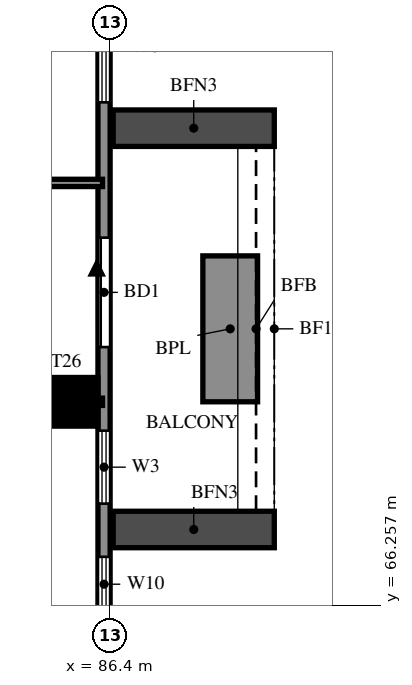
"""IFC4 building model, lengths in metres.
Left out: names, types, materials, properties, quantities, classifications, styles, units other than length and angle.
Written with IfcOpenShell. Run it as: python <this file> out.ifc"""

import sys

from ifc_helpers import new_model, si_unit, direction, frame, frame_2d, origin, origin_2d, place, context, subcontext, project, spatial, rectangle, extrude, source, transform, mapped, element, fill, save


model = new_model("IFC4")
c1 = context("Model", 3, precision=1e-05, world=origin(), true_north=direction((0.0, 1.0)))
c2 = subcontext(c1, "Body", "Model", "MODEL_VIEW")
j1 = project(units=[si_unit("LENGTHUNIT", "METRE"), si_unit("PLANEANGLEUNIT", "RADIAN")], contexts=[c1])
p1 = place(None, origin())
s1 = spatial("IfcSite", under=j1, at=p1, CompositionType="ELEMENT")
p2 = place(p1, origin())
s2 = spatial("IfcBuilding", under=s1, at=p2, CompositionType="ELEMENT")
p3 = place(p2, frame((0.0, 0.0, 185.0)))
s3 = spatial("IfcBuildingStorey", under=s2, at=p3, CompositionType="ELEMENT", Elevation=185.0)
m1 = source(origin(), c2, "Body", "SweptSolid", [
    extrude(rectangle(XDim=0.8, YDim=0.8, at=origin_2d()), origin(), (0.0, 0.0, 1.0), 3.2),
])
p4 = place(p3, frame((85.8, 69.6, 0.0), z_axis=(0.0, 0.0, 1.0), x_axis=(1.0, 0.0, 0.0)))
e1 = element("IfcColumn", 1, at=p4, inside=s3, PredefinedType="COLUMN", context=c2, shape_type="MappedRepresentation", body=[
    mapped(m1, transform((0.0, 0.0, 0.0))),
])
p5 = place(p3, frame((86.3, 48.2, 0.0), z_axis=(0.0, 0.0, 1.0), x_axis=(0.0, 1.0, 0.0)))
e2 = element("IfcWall", 2, at=p5, inside=s3, PredefinedType="SOLIDWALL", context=c2, shape_type="SweptSolid", body=[
    extrude(rectangle(XDim=28.6, YDim=0.2, at=frame_2d((14.3, 0.0))), origin(), (0.0, 0.0, 1.0), 3.2),
])
p6 = place(p5, frame((7.9, 0.0, 0.0)))
e3 = element("IfcOpeningElement", 3, at=p6, cuts=e2, PredefinedType="OPENING", context=c2, shape_type="SweptSolid", body=[
    extrude(rectangle(XDim=1.8, YDim=2.4, at=frame_2d((0.9, 1.2))), frame((0.0, 0.11, 0.0), z_axis=(0.0, -1.0, 0.0), x_axis=(1.0, 0.0, 0.0)), (0.0, 0.0, 1.0), 0.22),
])
p7 = place(p5, frame((22.3, 0.0, 0.0)))
e4 = element("IfcOpeningElement", 4, at=p7, cuts=e2, PredefinedType="OPENING", context=c2, shape_type="SweptSolid", body=[
    extrude(rectangle(XDim=1.8, YDim=2.4, at=frame_2d((0.9, 1.2))), frame((0.0, 0.11, 0.0), z_axis=(0.0, -1.0, 0.0), x_axis=(1.0, 0.0, 0.0)), (0.0, 0.0, 1.0), 0.22),
])
p8 = place(p5, frame((0.6, 0.0, 0.6)))
e5 = element("IfcOpeningElement", 5, at=p8, cuts=e2, PredefinedType="OPENING", context=c2, shape_type="SweptSolid", body=[
    extrude(rectangle(XDim=2.4, YDim=2.4, at=frame_2d((1.2, 1.2))), frame((0.0, 0.11, 0.0), z_axis=(0.0, -1.0, 0.0), x_axis=(1.0, 0.0, 0.0)), (0.0, 0.0, 1.0), 0.22),
])
p9 = place(p5, frame((3.55, 0.0, 0.6)))
e6 = element("IfcOpeningElement", 6, at=p9, cuts=e2, PredefinedType="OPENING", context=c2, shape_type="SweptSolid", body=[
    extrude(rectangle(XDim=0.9, YDim=2.4, at=frame_2d((0.45, 1.2))), frame((0.0, 0.11, 0.0), z_axis=(0.0, -1.0, 0.0), x_axis=(1.0, 0.0, 0.0)), (0.0, 0.0, 1.0), 0.22),
])
p10 = place(p5, frame((5.325, 0.0, 0.6)))
e7 = element("IfcOpeningElement", 7, at=p10, cuts=e2, PredefinedType="OPENING", context=c2, shape_type="SweptSolid", body=[
    extrude(rectangle(XDim=1.2, YDim=2.4, at=frame_2d((0.6, 1.2))), frame((0.0, 0.11, 0.0), z_axis=(0.0, -1.0, 0.0), x_axis=(1.0, 0.0, 0.0)), (0.0, 0.0, 1.0), 0.22),
])
p11 = place(p5, frame((11.925, 0.0, 0.6)))
e8 = element("IfcOpeningElement", 8, at=p11, cuts=e2, PredefinedType="OPENING", context=c2, shape_type="SweptSolid", body=[
    extrude(rectangle(XDim=1.8, YDim=2.4, at=frame_2d((0.9, 1.2))), frame((0.0, 0.11, 0.0), z_axis=(0.0, -1.0, 0.0), x_axis=(1.0, 0.0, 0.0)), (0.0, 0.0, 1.0), 0.22),
])
p12 = place(p5, frame((14.975, 0.0, 0.6)))
e9 = element("IfcOpeningElement", 9, at=p12, cuts=e2, PredefinedType="OPENING", context=c2, shape_type="SweptSolid", body=[
    extrude(rectangle(XDim=2.4, YDim=2.4, at=frame_2d((1.2, 1.2))), frame((0.0, 0.11, 0.0), z_axis=(0.0, -1.0, 0.0), x_axis=(1.0, 0.0, 0.0)), (0.0, 0.0, 1.0), 0.22),
])
p13 = place(p5, frame((17.95, 0.0, 0.6)))
e10 = element("IfcOpeningElement", 10, at=p13, cuts=e2, PredefinedType="OPENING", context=c2, shape_type="SweptSolid", body=[
    extrude(rectangle(XDim=0.9, YDim=2.4, at=frame_2d((0.45, 1.2))), frame((0.0, 0.11, 0.0), z_axis=(0.0, -1.0, 0.0), x_axis=(1.0, 0.0, 0.0)), (0.0, 0.0, 1.0), 0.22),
])
p14 = place(p5, frame((19.725, 0.0, 0.6)))
e11 = element("IfcOpeningElement", 11, at=p14, cuts=e2, PredefinedType="OPENING", context=c2, shape_type="SweptSolid", body=[
    extrude(rectangle(XDim=1.2, YDim=2.4, at=frame_2d((0.6, 1.2))), frame((0.0, 0.11, 0.0), z_axis=(0.0, -1.0, 0.0), x_axis=(1.0, 0.0, 0.0)), (0.0, 0.0, 1.0), 0.22),
])
p15 = place(p5, frame((26.325, 0.0, 0.6)))
e12 = element("IfcOpeningElement", 12, at=p15, cuts=e2, PredefinedType="OPENING", context=c2, shape_type="SweptSolid", body=[
    extrude(rectangle(XDim=1.8, YDim=2.4, at=frame_2d((0.9, 1.2))), frame((0.0, 0.11, 0.0), z_axis=(0.0, -1.0, 0.0), x_axis=(1.0, 0.0, 0.0)), (0.0, 0.0, 1.0), 0.22),
])
for number, where, z_axis, x_axis in (
    (13, (86.45, 67.5, 0.0), (0.0, 0.0, 1.0), (1.0, 0.0, 0.0)),
    (14, (86.45, 74.1, 0.0), (0.0, 0.0, 1.0), (1.0, 0.0, 0.0)),
):
    element("IfcWall", number, at=place(p3, frame(where, z_axis=z_axis, x_axis=x_axis)), inside=s3, PredefinedType="SOLIDWALL", context=c2, shape_type="SweptSolid", body=[
        extrude(rectangle(XDim=2.65, YDim=0.6, at=frame_2d((1.325, 0.0))), origin(), (0.0, 0.0, 1.0), 2.85),
    ])
p16 = place(p3, frame((88.375, 69.6, 0.0), z_axis=(0.0, 0.0, 1.0), x_axis=(0.0, 1.0, 0.0)))
e15 = element("IfcWall", 15, at=p16, inside=s3, PredefinedType="SOLIDWALL", context=c2, shape_type="SweptSolid", body=[
    extrude(rectangle(XDim=2.4, YDim=0.9, at=frame_2d((1.2, 0.0))), origin(), (0.0, 0.0, 1.0), 0.9),
])
p17 = place(p3, frame((79.2, 69.6, 0.0), z_axis=(0.0, 0.0, 1.0), x_axis=(1.0, 0.0, 0.0)))
e16 = element("IfcWall", 16, at=p17, inside=s3, PredefinedType="PARTITIONING", context=c2, shape_type="SweptSolid", body=[
    extrude(rectangle(XDim=7.075, YDim=0.12, at=frame_2d((3.538, 0.0))), origin(), (0.0, 0.0, 1.0), 3.2),
])
p18 = place(p3, frame((72.0, 73.2, 0.0), z_axis=(0.0, 0.0, 1.0), x_axis=(1.0, 0.0, 0.0)))
e17 = element("IfcWall", 17, at=p18, inside=s3, PredefinedType="PARTITIONING", context=c2, shape_type="SweptSolid", body=[
    extrude(rectangle(XDim=14.275, YDim=0.12, at=frame_2d((7.137, 0.0))), origin(), (0.0, 0.0, 1.0), 2.3),
])
p19 = place(p18, frame((5.7, 0.0, 0.0)))
e18 = element("IfcOpeningElement", 18, at=p19, cuts=e17, PredefinedType="OPENING", context=c2, shape_type="SweptSolid", body=[
    extrude(rectangle(XDim=0.9, YDim=2.1, at=frame_2d((0.45, 1.05))), frame((0.0, 0.07, 0.0), z_axis=(0.0, -1.0, 0.0), x_axis=(1.0, 0.0, 0.0)), (0.0, 0.0, 1.0), 0.14),
])
p20 = place(p7, origin())
e19 = element("IfcDoor", 19, at=p20, inside=s3, OperationType="DOUBLE_DOOR_SLIDING", PredefinedType="DOOR", context=c2, shape_type="SweptSolid", body=[
    extrude(rectangle(XDim=1.8, YDim=2.4, at=frame_2d((0.9, 1.2))), frame((0.0, 0.025, 0.0), z_axis=(0.0, -1.0, 0.0), x_axis=(1.0, 0.0, 0.0)), (0.0, 0.0, 1.0), 0.05),
])
fill(e4, e19)
p21 = place(p13, origin())
e20 = element("IfcWindow", 20, at=p21, inside=s3, PartitioningType="SINGLE_PANEL", PredefinedType="WINDOW", context=c2, shape_type="SweptSolid", body=[
    extrude(rectangle(XDim=0.9, YDim=2.4, at=frame_2d((0.45, 1.2))), frame((0.0, 0.03, 0.0), z_axis=(0.0, -1.0, 0.0), x_axis=(1.0, 0.0, 0.0)), (0.0, 0.0, 1.0), 0.06),
])
fill(e10, e20)
p22 = place(p14, origin())
e21 = element("IfcWindow", 21, at=p22, inside=s3, PartitioningType="SINGLE_PANEL", PredefinedType="WINDOW", context=c2, shape_type="SweptSolid", body=[
    extrude(rectangle(XDim=1.2, YDim=2.4, at=frame_2d((0.6, 1.2))), frame((0.0, 0.03, 0.0), z_axis=(0.0, -1.0, 0.0), x_axis=(1.0, 0.0, 0.0)), (0.0, 0.0, 1.0), 0.06),
])
fill(e11, e21)
p23 = place(p15, origin())
e22 = element("IfcWindow", 22, at=p23, inside=s3, PartitioningType="DOUBLE_PANEL_VERTICAL", PredefinedType="WINDOW", context=c2, shape_type="SweptSolid", body=[
    extrude(rectangle(XDim=1.8, YDim=2.4, at=frame_2d((0.9, 1.2))), frame((0.0, 0.03, 0.0), z_axis=(0.0, -1.0, 0.0), x_axis=(1.0, 0.0, 0.0)), (0.0, 0.0, 1.0), 0.06),
])
fill(e12, e22)
save(model, sys.argv[1])
